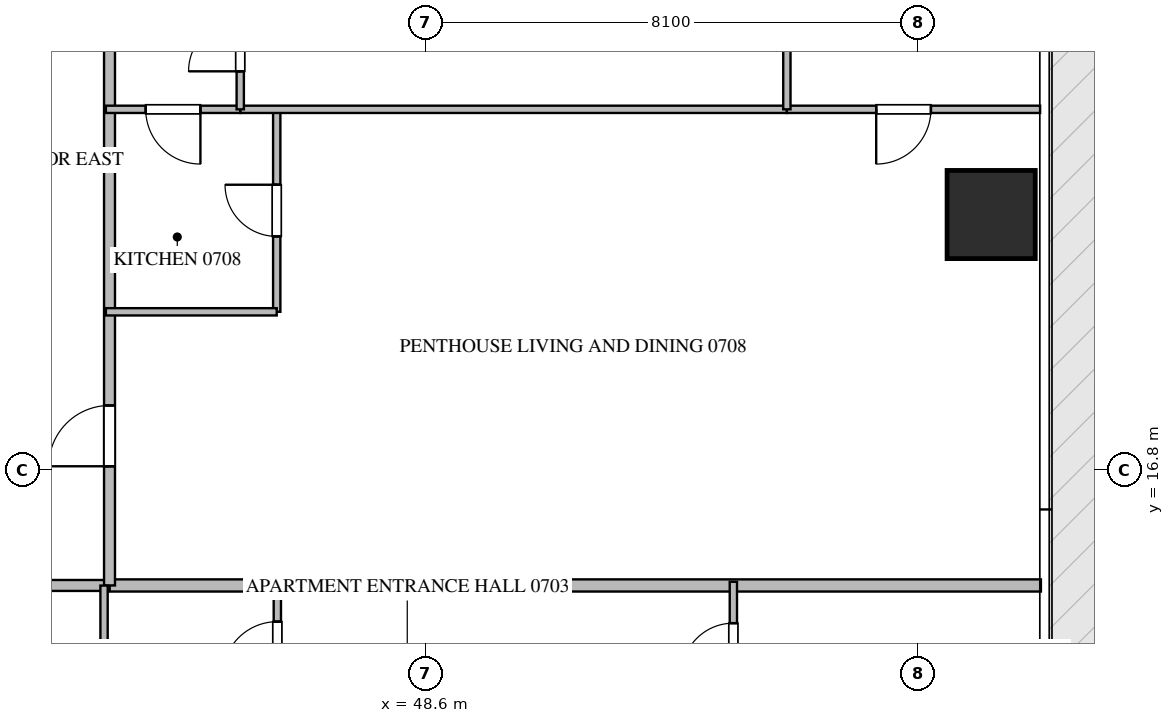
"""IFC4 building model, lengths in metres.
Left out: names, types, materials, properties, quantities, classifications, styles, units other than length and angle.
Written with IfcOpenShell. Run it as: python <this file> out.ifc"""

import sys

from ifc_helpers import new_model, si_unit, direction, frame, frame_2d, origin, origin_2d, place, context, subcontext, project, spatial, rectangle, extrude, source, transform, mapped, element, fill, save


model = new_model("IFC4")
c1 = context("Model", 3, precision=1e-05, world=origin(), true_north=direction((0.0, 1.0)))
c2 = subcontext(c1, "Body", "Model", "MODEL_VIEW")
j1 = project(units=[si_unit("LENGTHUNIT", "METRE"), si_unit("PLANEANGLEUNIT", "RADIAN")], contexts=[c1])
p1 = place(None, origin())
s1 = spatial("IfcSite", under=j1, at=p1, CompositionType="ELEMENT")
p2 = place(p1, origin())
s2 = spatial("IfcBuilding", under=s1, at=p2, CompositionType="ELEMENT")
p3 = place(p2, frame((0.0, 0.0, 34.2)))
s3 = spatial("IfcBuildingStorey", under=s2, at=p3, CompositionType="ELEMENT", Elevation=34.2)
m1 = source(origin(), c2, "Body", "SweptSolid", [
    extrude(rectangle(XDim=1.45, YDim=1.45, at=origin_2d()), origin(), (0.0, 0.0, 1.0), 3.75),
])
p4 = place(p3, frame((57.9, 21.0, -0.26), z_axis=(0.0, 0.0, 1.0), x_axis=(1.0, 0.0, 0.0)))
e1 = element("IfcColumn", 1, at=p4, inside=s3, PredefinedType="COLUMN", context=c2, shape_type="MappedRepresentation", body=[
    mapped(m1, transform((0.0, 0.0, 0.0), scale=1.0)),
])
p5 = place(p3, frame((43.4, 14.9, 0.0), z_axis=(0.0, 0.0, 1.0), x_axis=(1.0, 0.0, 0.0)))
e2 = element("IfcWall", 2, at=p5, inside=s3, PredefinedType="PARTITIONING", context=c2, shape_type="SweptSolid", body=[
    extrude(rectangle(XDim=15.318, YDim=0.2, at=frame_2d((7.659, 0.0))), origin(), (0.0, 0.0, 1.0), 3.49),
])
p6 = place(p3, frame((21.402, 14.9, 0.0), z_axis=(0.0, 0.0, 1.0), x_axis=(1.0, 0.0, 0.0)))
e3 = element("IfcWall", 3, at=p6, inside=s3, PredefinedType="PARTITIONING", context=c2, shape_type="SweptSolid", body=[
    extrude(rectangle(XDim=21.996, YDim=0.18, at=frame_2d((10.998, 0.0))), origin(), (0.0, 0.0, 1.0), 3.49),
])
p7 = place(p6, frame((2.1, 0.0, 0.0)))
e4 = element("IfcOpeningElement", 4, at=p7, cuts=e3, PredefinedType="OPENING", context=c2, shape_type="SweptSolid", body=[
    extrude(rectangle(XDim=1.0, YDim=2.15, at=frame_2d((0.5, 1.075))), frame((0.0, 0.1, 0.0), z_axis=(0.0, -1.0, 0.0), x_axis=(1.0, 0.0, 0.0)), (0.0, 0.0, 1.0), 0.2),
])
p8 = place(p6, frame((6.719, 0.0, 0.0)))
e5 = element("IfcOpeningElement", 5, at=p8, cuts=e3, PredefinedType="OPENING", context=c2, shape_type="SweptSolid", body=[
    extrude(rectangle(XDim=1.0, YDim=2.15, at=frame_2d((0.5, 1.075))), frame((0.0, 0.1, 0.0), z_axis=(0.0, -1.0, 0.0), x_axis=(1.0, 0.0, 0.0)), (0.0, 0.0, 1.0), 0.2),
])
p9 = place(p6, frame((18.896, 0.0, 0.0)))
e6 = element("IfcOpeningElement", 6, at=p9, cuts=e3, PredefinedType="OPENING", context=c2, shape_type="SweptSolid", body=[
    extrude(rectangle(XDim=1.0, YDim=2.15, at=frame_2d((0.5, 1.075))), frame((0.0, 0.1, 0.0), z_axis=(0.0, -1.0, 0.0), x_axis=(1.0, 0.0, 0.0)), (0.0, 0.0, 1.0), 0.2),
])
p10 = place(p3, frame((43.4, 14.9, 0.0), z_axis=(0.0, 0.0, 1.0), x_axis=(0.0, 1.0, 0.0)))
e7 = element("IfcWall", 7, at=p10, inside=s3, PredefinedType="PARTITIONING", context=c2, shape_type="SweptSolid", body=[
    extrude(rectangle(XDim=20.6, YDim=0.18, at=frame_2d((10.3, 0.0))), origin(), (0.0, 0.0, 1.0), 3.49),
])
p11 = place(p10, frame((1.96, 0.0, 0.0)))
e8 = element("IfcOpeningElement", 8, at=p11, cuts=e7, PredefinedType="OPENING", context=c2, shape_type="SweptSolid", body=[
    extrude(rectangle(XDim=1.0, YDim=2.15, at=frame_2d((0.5, 1.075))), frame((0.0, 0.1, 0.0), z_axis=(0.0, -1.0, 0.0), x_axis=(1.0, 0.0, 0.0)), (0.0, 0.0, 1.0), 0.2),
])
p12 = place(p3, frame((43.31, 12.15, 0.0), z_axis=(0.0, 0.0, 1.0), x_axis=(0.0, 1.0, 0.0)))
e9 = element("IfcWall", 9, at=p12, inside=s3, PredefinedType="PARTITIONING", context=c2, shape_type="SweptSolid", body=[
    extrude(rectangle(XDim=2.748, YDim=0.12, at=frame_2d((1.374, 0.0))), origin(), (0.0, 0.0, 1.0), 3.49),
])
p13 = place(p3, frame((46.16, 12.75, 0.0), z_axis=(0.0, 0.0, 1.0), x_axis=(0.0, 1.0, 0.0)))
e10 = element("IfcWall", 10, at=p13, inside=s3, PredefinedType="PARTITIONING", context=c2, shape_type="SweptSolid", body=[
    extrude(rectangle(XDim=2.21, YDim=0.12, at=frame_2d((1.105, 0.0))), origin(), (0.0, 0.0, 1.0), 3.49),
])
p14 = place(p13, frame((0.655, 0.0, 0.0)))
e11 = element("IfcOpeningElement", 11, at=p14, cuts=e10, PredefinedType="OPENING", context=c2, shape_type="SweptSolid", body=[
    extrude(rectangle(XDim=0.9, YDim=2.1, at=frame_2d((0.45, 1.05))), frame((0.0, 0.07, 0.0), z_axis=(0.0, -1.0, 0.0), x_axis=(1.0, 0.0, 0.0)), (0.0, 0.0, 1.0), 0.14),
])
p15 = place(p3, frame((53.66, 12.75, 0.0), z_axis=(0.0, 0.0, 1.0), x_axis=(0.0, 1.0, 0.0)))
e12 = element("IfcWall", 12, at=p15, inside=s3, PredefinedType="PARTITIONING", context=c2, shape_type="SweptSolid", body=[
    extrude(rectangle(XDim=2.21, YDim=0.12, at=frame_2d((1.105, 0.0))), origin(), (0.0, 0.0, 1.0), 3.49),
])
p16 = place(p15, frame((0.68, 0.0, 0.0)))
e13 = element("IfcOpeningElement", 13, at=p16, cuts=e12, PredefinedType="OPENING", context=c2, shape_type="SweptSolid", body=[
    extrude(rectangle(XDim=0.85, YDim=2.1, at=frame_2d((0.425, 1.05))), frame((0.0, 0.07, 0.0), z_axis=(0.0, -1.0, 0.0), x_axis=(1.0, 0.0, 0.0)), (0.0, 0.0, 1.0), 0.14),
])
p17 = place(p3, frame((46.15, 19.4, 0.0), z_axis=(0.0, 0.0, 1.0), x_axis=(0.0, 1.0, 0.0)))
e14 = element("IfcWall", 14, at=p17, inside=s3, PredefinedType="PARTITIONING", context=c2, shape_type="SweptSolid", body=[
    extrude(rectangle(XDim=3.33, YDim=0.12, at=frame_2d((1.665, 0.0))), origin(), (0.0, 0.0, 1.0), 3.49),
])
p18 = place(p17, frame((1.24, 0.0, 0.0)))
e15 = element("IfcOpeningElement", 15, at=p18, cuts=e14, PredefinedType="OPENING", context=c2, shape_type="SweptSolid", body=[
    extrude(rectangle(XDim=0.85, YDim=2.1, at=frame_2d((0.425, 1.05))), frame((0.0, 0.07, 0.0), z_axis=(0.0, -1.0, 0.0), x_axis=(1.0, 0.0, 0.0)), (0.0, 0.0, 1.0), 0.14),
])
p19 = place(p3, frame((46.15, 19.4, 0.0), z_axis=(0.0, 0.0, 1.0), x_axis=(-1.0, 0.0, 0.0)))
e16 = element("IfcWall", 16, at=p19, inside=s3, PredefinedType="PARTITIONING", context=c2, shape_type="SweptSolid", body=[
    extrude(rectangle(XDim=2.81, YDim=0.12, at=frame_2d((1.405, 0.0))), origin(), (0.0, 0.0, 1.0), 3.49),
])
p20 = place(p3, frame((45.55, 22.73, 0.0), z_axis=(0.0, 0.0, 1.0), x_axis=(-1.0, 0.0, 0.0)))
e17 = element("IfcWall", 17, at=p20, inside=s3, PredefinedType="PARTITIONING", context=c2, shape_type="SweptSolid", body=[
    extrude(rectangle(XDim=2.21, YDim=0.12, at=frame_2d((1.105, 0.0))), origin(), (0.0, 0.0, 1.0), 3.49),
])
p21 = place(p20, frame((0.655, 0.0, 0.0)))
e18 = element("IfcOpeningElement", 18, at=p21, cuts=e17, PredefinedType="OPENING", context=c2, shape_type="SweptSolid", body=[
    extrude(rectangle(XDim=0.9, YDim=2.1, at=frame_2d((0.45, 1.05))), frame((0.0, 0.07, 0.0), z_axis=(0.0, -1.0, 0.0), x_axis=(1.0, 0.0, 0.0)), (0.0, 0.0, 1.0), 0.14),
])
p22 = place(p3, frame((58.705, 22.73, 0.0), z_axis=(0.0, 0.0, 1.0), x_axis=(-1.0, 0.0, 0.0)))
e19 = element("IfcWall", 19, at=p22, inside=s3, PredefinedType="PARTITIONING", context=c2, shape_type="SweptSolid", body=[
    extrude(rectangle(XDim=4.165, YDim=0.12, at=frame_2d((2.083, 0.0))), origin(), (0.0, 0.0, 1.0), 3.49),
])
p23 = place(p22, frame((1.796, 0.0, 0.0)))
e20 = element("IfcOpeningElement", 20, at=p23, cuts=e19, PredefinedType="OPENING", context=c2, shape_type="SweptSolid", body=[
    extrude(rectangle(XDim=0.9, YDim=2.1, at=frame_2d((0.45, 1.05))), frame((0.0, 0.07, 0.0), z_axis=(0.0, -1.0, 0.0), x_axis=(1.0, 0.0, 0.0)), (0.0, 0.0, 1.0), 0.14),
])
p24 = place(p3, frame((54.538, 22.73, 0.0), z_axis=(0.0, 0.0, 1.0), x_axis=(-1.0, 0.0, 0.0)))
e21 = element("IfcWall", 21, at=p24, inside=s3, PredefinedType="PARTITIONING", context=c2, shape_type="SweptSolid", body=[
    extrude(rectangle(XDim=8.986, YDim=0.12, at=frame_2d((4.493, 0.0))), origin(), (0.0, 0.0, 1.0), 3.49),
])
p25 = place(p3, frame((54.54, 22.73, 0.0), z_axis=(0.0, 0.0, 1.0), x_axis=(0.0, 1.0, 0.0)))
e22 = element("IfcWall", 22, at=p25, inside=s3, PredefinedType="PARTITIONING", context=c2, shape_type="SweptSolid", body=[
    extrude(rectangle(XDim=5.07, YDim=0.12, at=frame_2d((2.535, 0.0))), origin(), (0.0, 0.0, 1.0), 3.49),
])
p26 = place(p3, frame((45.55, 22.73, 0.0), z_axis=(0.0, 0.0, 1.0), x_axis=(0.0, 1.0, 0.0)))
e23 = element("IfcWall", 23, at=p26, inside=s3, PredefinedType="PARTITIONING", context=c2, shape_type="SweptSolid", body=[
    extrude(rectangle(XDim=2.1, YDim=0.12, at=frame_2d((1.05, 0.0))), origin(), (0.0, 0.0, 1.0), 3.49),
])
p27 = place(p26, frame((0.625, 0.0, 0.0)))
e24 = element("IfcOpeningElement", 24, at=p27, cuts=e23, PredefinedType="OPENING", context=c2, shape_type="SweptSolid", body=[
    extrude(rectangle(XDim=0.85, YDim=2.1, at=frame_2d((0.425, 1.05))), frame((0.0, 0.07, 0.0), z_axis=(0.0, -1.0, 0.0), x_axis=(1.0, 0.0, 0.0)), (0.0, 0.0, 1.0), 0.14),
])
m2 = source(origin(), c2, "Body", "SweptSolid", [
    extrude(rectangle(XDim=1.0, YDim=2.15, at=frame_2d((0.5, 1.075))), frame((0.0, 0.025, 0.0), z_axis=(0.0, -1.0, 0.0), x_axis=(1.0, 0.0, 0.0)), (0.0, 0.0, 1.0), 0.05),
])
p28 = place(p11, origin())
e25 = element("IfcDoor", 25, at=p28, inside=s3, OperationType="SINGLE_SWING_LEFT", PredefinedType="DOOR", context=c2, shape_type="MappedRepresentation", body=[
    mapped(m2, transform((0.0, 0.0, 0.0), scale=1.0)),
])
fill(e8, e25)
m3 = source(origin(), c2, "Body", "SweptSolid", [
    extrude(rectangle(XDim=0.9, YDim=2.1, at=frame_2d((0.45, 1.05))), frame((0.0, 0.025, 0.0), z_axis=(0.0, -1.0, 0.0), x_axis=(1.0, 0.0, 0.0)), (0.0, 0.0, 1.0), 0.05),
])
p29 = place(p14, origin())
e26 = element("IfcDoor", 26, at=p29, inside=s3, OperationType="SINGLE_SWING_LEFT", PredefinedType="DOOR", context=c2, shape_type="MappedRepresentation", body=[
    mapped(m3, transform((0.0, 0.0, 0.0), scale=1.0)),
])
fill(e11, e26)
m4 = source(origin(), c2, "Body", "SweptSolid", [
    extrude(rectangle(XDim=0.85, YDim=2.1, at=frame_2d((0.425, 1.05))), frame((0.0, 0.025, 0.0), z_axis=(0.0, -1.0, 0.0), x_axis=(1.0, 0.0, 0.0)), (0.0, 0.0, 1.0), 0.05),
])
p30 = place(p16, origin())
e27 = element("IfcDoor", 27, at=p30, inside=s3, OperationType="SINGLE_SWING_LEFT", PredefinedType="DOOR", context=c2, shape_type="MappedRepresentation", body=[
    mapped(m4, transform((0.0, 0.0, 0.0), scale=1.0)),
])
fill(e13, e27)
p31 = place(p18, origin())
e28 = element("IfcDoor", 28, at=p31, inside=s3, OperationType="SINGLE_SWING_RIGHT", PredefinedType="DOOR", context=c2, shape_type="MappedRepresentation", body=[
    mapped(m4, transform((0.0, 0.0, 0.0), scale=1.0)),
])
fill(e15, e28)
p32 = place(p21, origin())
e29 = element("IfcDoor", 29, at=p32, inside=s3, OperationType="SINGLE_SWING_LEFT", PredefinedType="DOOR", context=c2, shape_type="MappedRepresentation", body=[
    mapped(m3, transform((0.0, 0.0, 0.0), scale=1.0)),
])
fill(e18, e29)
p33 = place(p23, origin())
e30 = element("IfcDoor", 30, at=p33, inside=s3, OperationType="SINGLE_SWING_RIGHT", PredefinedType="DOOR", context=c2, shape_type="MappedRepresentation", body=[
    mapped(m3, transform((0.0, 0.0, 0.0), scale=1.0)),
])
fill(e20, e30)
p34 = place(p27, origin())
e31 = element("IfcDoor", 31, at=p34, inside=s3, OperationType="SINGLE_SWING_LEFT", PredefinedType="DOOR", context=c2, shape_type="MappedRepresentation", body=[
    mapped(m4, transform((0.0, 0.0, 0.0), scale=1.0)),
])
fill(e24, e31)
save(model, sys.argv[1])
